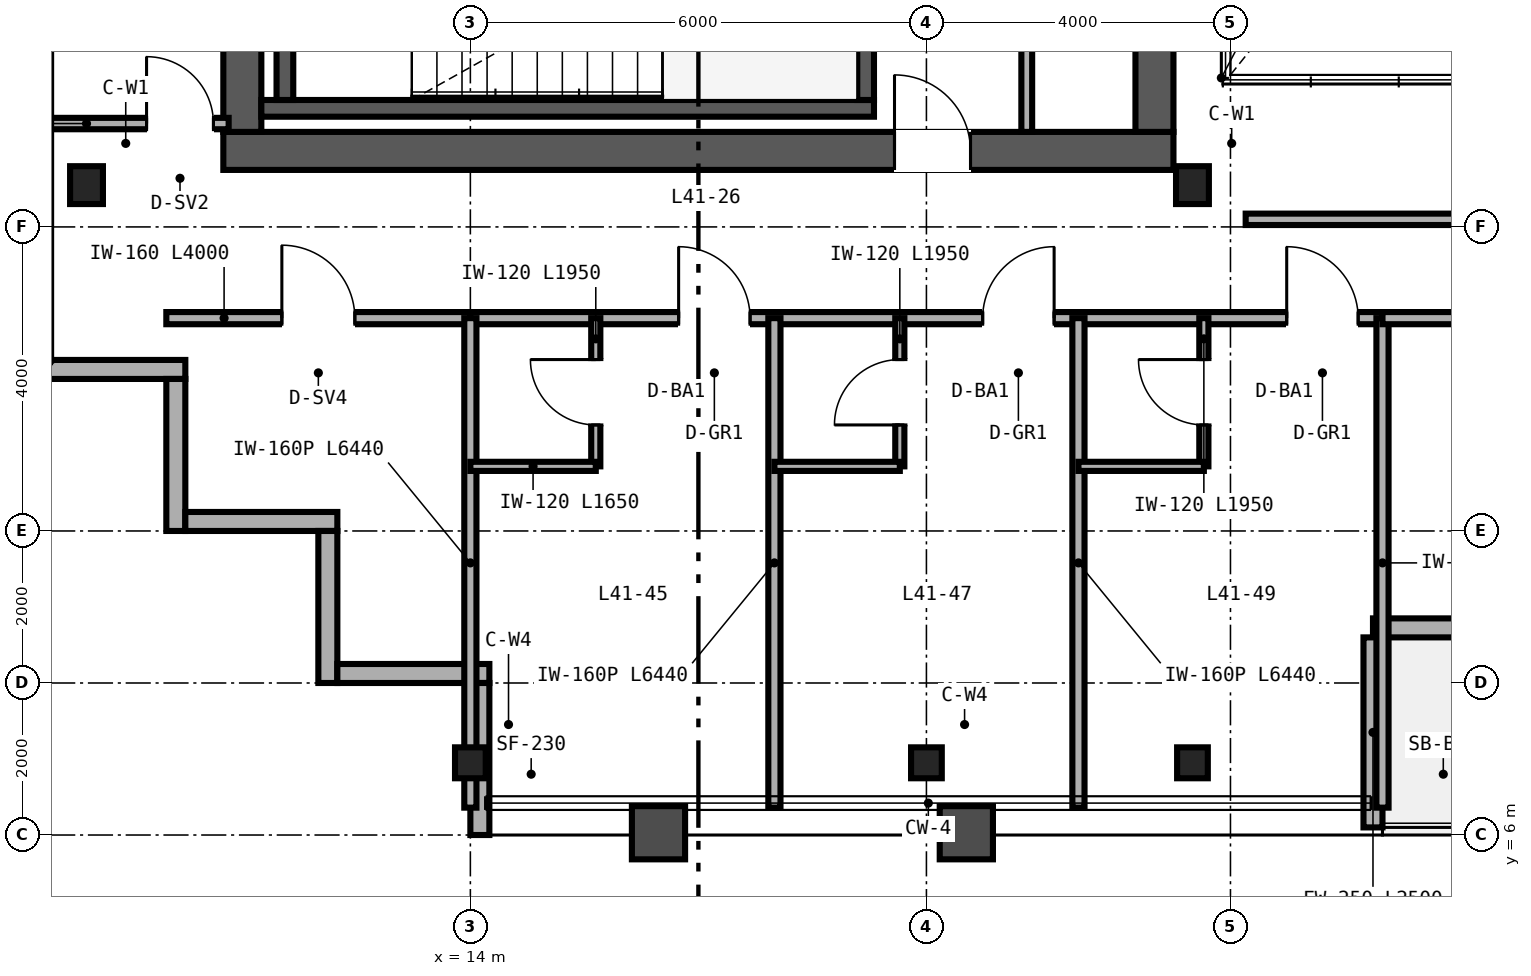
"""IFC4 building model, lengths in metres.
Left out: names, types, materials, properties, quantities, classifications, styles, units other than length and angle.
Written with IfcOpenShell. Run it as: python <this file> out.ifc"""

import sys

from ifc_helpers import new_model, si_unit, direction, frame, frame_2d, origin, origin_2d, place, context, subcontext, project, spatial, rectangle, i_section, extrude, source, transform, mapped, element, fill, save


model = new_model("IFC4")
c1 = context("Model", 3, precision=1e-05, world=origin(), true_north=direction((0.0, 1.0)))
c2 = subcontext(c1, "Body", "Model", "MODEL_VIEW")
j1 = project(units=[si_unit("LENGTHUNIT", "METRE"), si_unit("PLANEANGLEUNIT", "RADIAN")], contexts=[c1])
p1 = place(None, origin())
s1 = spatial("IfcSite", under=j1, at=p1, CompositionType="ELEMENT")
p2 = place(p1, origin())
s2 = spatial("IfcBuilding", under=s1, at=p2, CompositionType="ELEMENT")
p3 = place(p2, frame((0.0, 0.0, 166.8)))
s3 = spatial("IfcBuildingStorey", under=s2, at=p3, CompositionType="ELEMENT", Elevation=166.8)
p4 = place(p3, frame((10.75, 15.0, 0.0), z_axis=(0.0, 0.0, 1.0), x_axis=(1.0, 0.0, 0.0)))
e1 = element("IfcWall", 1, at=p4, inside=s3, PredefinedType="SHEAR", context=c2, shape_type="SweptSolid", body=[
    extrude(rectangle(XDim=12.5, YDim=0.5, at=frame_2d((6.25, 0.0))), origin(), (0.0, 0.0, 1.0), 3.37),
])
p5 = place(p4, frame((8.83, 0.0, 0.0)))
e2 = element("IfcOpeningElement", 2, at=p5, cuts=e1, PredefinedType="OPENING", context=c2, shape_type="SweptSolid", body=[
    extrude(rectangle(XDim=1.0, YDim=2.15, at=frame_2d((0.5, 1.075))), frame((0.0, 0.26, 0.0), z_axis=(0.0, -1.0, 0.0), x_axis=(1.0, 0.0, 0.0)), (0.0, 0.0, 1.0), 0.52),
])
for number, where, z_axis, x_axis in (
    (3, (11.0, 15.25, 0.0), (0.0, 0.0, 1.0), (0.0, 1.0, 0.0)),
    (4, (23.0, 15.25, 0.0), (0.0, 0.0, 1.0), (0.0, 1.0, 0.0)),
):
    element("IfcWall", number, at=place(p3, frame(where, z_axis=z_axis, x_axis=x_axis)), inside=s3, PredefinedType="SHEAR", context=c2, shape_type="SweptSolid", body=[
        extrude(rectangle(XDim=21.5, YDim=0.5, at=frame_2d((10.75, 0.0))), origin(), (0.0, 0.0, 1.0), 3.37),
    ])
p6 = place(p3, frame((11.25, 15.56, 0.0), z_axis=(0.0, 0.0, 1.0), x_axis=(1.0, 0.0, 0.0)))
e5 = element("IfcWall", 5, at=p6, inside=s3, PredefinedType="SHEAR", context=c2, shape_type="SweptSolid", body=[
    extrude(rectangle(XDim=8.06, YDim=0.22, at=frame_2d((4.03, 0.0))), origin(), (0.0, 0.0, 1.0), 3.4),
])
for number, where, z_axis, x_axis in (
    (6, (11.56, 15.67, 0.0), (0.0, 0.0, 1.0), (0.0, 1.0, 0.0)),
    (7, (19.2, 15.67, 0.0), (0.0, 0.0, 1.0), (0.0, 1.0, 0.0)),
):
    element("IfcWall", number, at=place(p3, frame(where, z_axis=z_axis, x_axis=x_axis)), inside=s3, PredefinedType="SHEAR", context=c2, shape_type="SweptSolid", body=[
        extrude(rectangle(XDim=3.28, YDim=0.22, at=frame_2d((1.64, 0.0))), origin(), (0.0, 0.0, 1.0), 3.4),
    ])
m1 = source(origin(), c2, "Body", "SweptSolid", [
    extrude(i_section(OverallWidth=0.432, OverallDepth=0.498, WebThickness=0.056, FlangeThickness=0.089, FilletRadius=0.025, at=origin_2d()), origin(), (0.0, 0.0, 1.0), 3.37),
])
for number, where, z_axis, x_axis in (
    (8, (8.95, 14.55, 0.0), (0.0, 0.0, 1.0), (1.0, 0.0, 0.0)),
    (9, (23.5, 14.55, 0.0), (0.0, 0.0, 1.0), (1.0, 0.0, 0.0)),
):
    element("IfcColumn", number, at=place(p3, frame(where, z_axis=z_axis, x_axis=x_axis)), inside=s3, PredefinedType="COLUMN", context=c2, shape_type="MappedRepresentation", body=[
        mapped(m1, transform((0.0, 0.0, 0.0), scale=1.0)),
    ])
m2 = source(origin(), c2, "Body", "SweptSolid", [
    extrude(i_section(OverallWidth=0.404, OverallDepth=0.407, WebThickness=0.027, FlangeThickness=0.044, FilletRadius=0.025, at=origin_2d()), origin(), (0.0, 0.0, 1.0), 3.37),
])
for number, where, z_axis, x_axis in (
    (10, (14.0, 6.95, 0.0), (0.0, 0.0, 1.0), (1.0, 0.0, 0.0)),
    (11, (20.0, 6.95, 0.0), (0.0, 0.0, 1.0), (1.0, 0.0, 0.0)),
    (12, (23.5, 6.95, 0.0), (0.0, 0.0, 1.0), (1.0, 0.0, 0.0)),
):
    element("IfcColumn", number, at=place(p3, frame(where, z_axis=z_axis, x_axis=x_axis)), inside=s3, PredefinedType="COLUMN", context=c2, shape_type="MappedRepresentation", body=[
        mapped(m2, transform((0.0, 0.0, 0.0), scale=1.0)),
    ])
p7 = place(p3, frame((8.0, 12.125, 0.0), z_axis=(0.0, 0.0, 1.0), x_axis=(1.0, 0.0, 0.0)))
e13 = element("IfcWall", 13, at=p7, inside=s3, PredefinedType="SOLIDWALL", context=c2, shape_type="SweptSolid", body=[
    extrude(rectangle(XDim=2.25, YDim=0.25, at=frame_2d((1.125, 0.0))), origin(), (0.0, 0.0, 1.0), 3.37),
])
for number, where, z_axis, x_axis in (
    (14, (10.125, 12.0, 0.0), (0.0, 0.0, 1.0), (0.0, -1.0, 0.0)),
    (15, (10.25, 10.125, 0.0), (0.0, 0.0, 1.0), (1.0, 0.0, 0.0)),
    (16, (12.125, 10.0, 0.0), (0.0, 0.0, 1.0), (0.0, -1.0, 0.0)),
    (17, (12.25, 8.125, 0.0), (0.0, 0.0, 1.0), (1.0, 0.0, 0.0)),
):
    element("IfcWall", number, at=place(p3, frame(where, z_axis=z_axis, x_axis=x_axis)), inside=s3, PredefinedType="SOLIDWALL", context=c2, shape_type="SweptSolid", body=[
        extrude(rectangle(XDim=2.0, YDim=0.25, at=frame_2d((1.0, 0.0))), origin(), (0.0, 0.0, 1.0), 3.37),
    ])
p8 = place(p3, frame((14.125, 8.0, 0.0), z_axis=(0.0, 0.0, 1.0), x_axis=(0.0, -1.0, 0.0)))
e18 = element("IfcWall", 18, at=p8, inside=s3, PredefinedType="SOLIDWALL", context=c2, shape_type="SweptSolid", body=[
    extrude(rectangle(XDim=2.0, YDim=0.25, at=frame_2d((1.0, 0.0))), origin(), (0.0, 0.0, 1.0), 2.677),
])
p9 = place(p3, frame((25.875, 8.725, 0.0), z_axis=(0.0, 0.0, 1.0), x_axis=(1.0, 0.0, 0.0)))
e19 = element("IfcWall", 19, at=p9, inside=s3, PredefinedType="SOLIDWALL", context=c2, shape_type="SweptSolid", body=[
    extrude(rectangle(XDim=12.25, YDim=0.25, at=frame_2d((6.125, 0.0))), origin(), (0.0, 0.0, 1.0), 3.37),
])
p10 = place(p9, frame((5.6, 0.0, 0.0)))
e20 = element("IfcOpeningElement", 20, at=p10, cuts=e19, PredefinedType="OPENING", context=c2, shape_type="SweptSolid", body=[
    extrude(rectangle(XDim=1.05, YDim=2.15, at=frame_2d((0.525, 1.075))), frame((0.0, 0.135, 0.0), z_axis=(0.0, -1.0, 0.0), x_axis=(1.0, 0.0, 0.0)), (0.0, 0.0, 1.0), 0.27),
])
p11 = place(p3, frame((25.875, 6.1, 0.0), z_axis=(0.0, 0.0, 1.0), x_axis=(0.0, 1.0, 0.0)))
e21 = element("IfcWall", 21, at=p11, inside=s3, PredefinedType="SOLIDWALL", context=c2, shape_type="SweptSolid", body=[
    extrude(rectangle(XDim=2.5, YDim=0.25, at=frame_2d((1.25, 0.0))), origin(), (0.0, 0.0, 1.0), 2.443),
])
p12 = place(p3, frame((21.32, 15.25, 0.0), z_axis=(0.0, 0.0, 1.0), x_axis=(0.0, 1.0, 0.0)))
e22 = element("IfcWall", 22, at=p12, inside=s3, PredefinedType="PARTITIONING", context=c2, shape_type="SweptSolid", body=[
    extrude(rectangle(XDim=3.59, YDim=0.142, at=frame_2d((1.795, 0.0))), origin(), (0.0, 0.0, 1.0), 3.37),
])
p13 = place(p12, frame((1.25, 0.0, 0.0)))
e23 = element("IfcOpeningElement", 23, at=p13, cuts=e22, PredefinedType="OPENING", context=c2, shape_type="SweptSolid", body=[
    extrude(rectangle(XDim=0.84, YDim=2.1, at=frame_2d((0.42, 1.05))), frame((0.0, 0.081, 0.0), z_axis=(0.0, -1.0, 0.0), x_axis=(1.0, 0.0, 0.0)), (0.0, 0.0, 1.0), 0.162),
])
p14 = place(p3, frame((24.2, 14.1, 0.0), z_axis=(0.0, 0.0, 1.0), x_axis=(1.0, 0.0, 0.0)))
e24 = element("IfcWall", 24, at=p14, inside=s3, PredefinedType="PARTITIONING", context=c2, shape_type="SweptSolid", body=[
    extrude(rectangle(XDim=15.6, YDim=0.15, at=frame_2d((7.8, 0.0))), origin(), (0.0, 0.0, 1.0), 3.37),
])
p15 = place(p14, frame((7.0, 0.0, 0.0)))
e25 = element("IfcOpeningElement", 25, at=p15, cuts=e24, PredefinedType="OPENING", context=c2, shape_type="SweptSolid", body=[
    extrude(rectangle(XDim=0.96, YDim=2.15, at=frame_2d((0.48, 1.075))), frame((0.0, 0.085, 0.0), z_axis=(0.0, -1.0, 0.0), x_axis=(1.0, 0.0, 0.0)), (0.0, 0.0, 1.0), 0.17),
])
p16 = place(p3, frame((8.16, 15.36, 0.0), z_axis=(0.0, 0.0, 1.0), x_axis=(1.0, 0.0, 0.0)))
e26 = element("IfcWall", 26, at=p16, inside=s3, PredefinedType="PARTITIONING", context=c2, shape_type="SweptSolid", body=[
    extrude(rectangle(XDim=2.66, YDim=0.15, at=frame_2d((1.33, 0.0))), origin(), (0.0, 0.0, 1.0), 2.591),
])
p17 = place(p16, frame((1.58, 0.0, 0.0)))
e27 = element("IfcOpeningElement", 27, at=p17, cuts=e26, PredefinedType="OPENING", context=c2, shape_type="SweptSolid", body=[
    extrude(rectangle(XDim=0.88, YDim=2.15, at=frame_2d((0.44, 1.075))), frame((0.0, 0.085, 0.0), z_axis=(0.0, -1.0, 0.0), x_axis=(1.0, 0.0, 0.0)), (0.0, 0.0, 1.0), 0.17),
])
p18 = place(p3, frame((10.0, 12.8, 0.0), z_axis=(0.0, 0.0, 1.0), x_axis=(1.0, 0.0, 0.0)))
e28 = element("IfcWall", 28, at=p18, inside=s3, PredefinedType="PARTITIONING", context=c2, shape_type="SweptSolid", body=[
    extrude(rectangle(XDim=4.0, YDim=0.16, at=frame_2d((2.0, 0.0))), origin(), (0.0, 0.0, 1.0), 3.37),
])
p19 = place(p18, frame((1.52, 0.0, 0.0)))
e29 = element("IfcOpeningElement", 29, at=p19, cuts=e28, PredefinedType="OPENING", context=c2, shape_type="SweptSolid", body=[
    extrude(rectangle(XDim=0.96, YDim=2.15, at=frame_2d((0.48, 1.075))), frame((0.0, 0.09, 0.0), z_axis=(0.0, -1.0, 0.0), x_axis=(1.0, 0.0, 0.0)), (0.0, 0.0, 1.0), 0.18),
])
p20 = place(p3, frame((14.0, 12.8, 0.0), z_axis=(0.0, 0.0, 1.0), x_axis=(1.0, 0.0, 0.0)))
e30 = element("IfcWall", 30, at=p20, inside=s3, PredefinedType="PARTITIONING", context=c2, shape_type="SweptSolid", body=[
    extrude(rectangle(XDim=12.0, YDim=0.16, at=frame_2d((6.0, 0.0))), origin(), (0.0, 0.0, 1.0), 2.913),
])
p21 = place(p20, frame((2.74, 0.0, 0.0)))
e31 = element("IfcOpeningElement", 31, at=p21, cuts=e30, PredefinedType="OPENING", context=c2, shape_type="SweptSolid", body=[
    extrude(rectangle(XDim=0.94, YDim=2.15, at=frame_2d((0.47, 1.075))), frame((0.0, 0.09, 0.0), z_axis=(0.0, -1.0, 0.0), x_axis=(1.0, 0.0, 0.0)), (0.0, 0.0, 1.0), 0.18),
])
p22 = place(p20, frame((6.74, 0.0, 0.0)))
e32 = element("IfcOpeningElement", 32, at=p22, cuts=e30, PredefinedType="OPENING", context=c2, shape_type="SweptSolid", body=[
    extrude(rectangle(XDim=0.94, YDim=2.15, at=frame_2d((0.47, 1.075))), frame((0.0, 0.09, 0.0), z_axis=(0.0, -1.0, 0.0), x_axis=(1.0, 0.0, 0.0)), (0.0, 0.0, 1.0), 0.18),
])
p23 = place(p20, frame((10.74, 0.0, 0.0)))
e33 = element("IfcOpeningElement", 33, at=p23, cuts=e30, PredefinedType="OPENING", context=c2, shape_type="SweptSolid", body=[
    extrude(rectangle(XDim=0.94, YDim=2.15, at=frame_2d((0.47, 1.075))), frame((0.0, 0.09, 0.0), z_axis=(0.0, -1.0, 0.0), x_axis=(1.0, 0.0, 0.0)), (0.0, 0.0, 1.0), 0.18),
])
p24 = place(p3, frame((14.0, 6.36, 0.0), z_axis=(0.0, 0.0, 1.0), x_axis=(0.0, 1.0, 0.0)))
e34 = element("IfcWall", 34, at=p24, inside=s3, PredefinedType="PARTITIONING", context=c2, shape_type="SweptSolid", body=[
    extrude(rectangle(XDim=6.44, YDim=0.16, at=frame_2d((3.22, 0.0))), origin(), (0.0, 0.0, 1.0), 2.677),
])
p25 = place(p3, frame((26.0, 6.36, 0.0), z_axis=(0.0, 0.0, 1.0), x_axis=(0.0, 1.0, 0.0)))
e35 = element("IfcWall", 35, at=p25, inside=s3, PredefinedType="PARTITIONING", context=c2, shape_type="SweptSolid", body=[
    extrude(rectangle(XDim=6.44, YDim=0.16, at=frame_2d((3.22, 0.0))), origin(), (0.0, 0.0, 1.0), 2.443),
])
p26 = place(p3, frame((18.0, 6.36, 0.0), z_axis=(0.0, 0.0, 1.0), x_axis=(0.0, 1.0, 0.0)))
e36 = element("IfcWall", 36, at=p26, inside=s3, PredefinedType="PARTITIONING", context=c2, shape_type="SweptSolid", body=[
    extrude(rectangle(XDim=6.44, YDim=0.16, at=frame_2d((3.22, 0.0))), origin(), (0.0, 0.0, 1.0), 2.677),
])
p27 = place(p3, frame((15.65, 10.85, 0.0), z_axis=(0.0, 0.0, 1.0), x_axis=(0.0, 1.0, 0.0)))
e37 = element("IfcWall", 37, at=p27, inside=s3, PredefinedType="PARTITIONING", context=c2, shape_type="SweptSolid", body=[
    extrude(rectangle(XDim=1.95, YDim=0.12, at=frame_2d((0.975, 0.0))), origin(), (0.0, 0.0, 1.0), 3.37),
])
p28 = place(p27, frame((0.545, 0.0, 0.0)))
e38 = element("IfcOpeningElement", 38, at=p28, cuts=e37, PredefinedType="OPENING", context=c2, shape_type="SweptSolid", body=[
    extrude(rectangle(XDim=0.86, YDim=2.1, at=frame_2d((0.43, 1.05))), frame((0.0, 0.07, 0.0), z_axis=(0.0, -1.0, 0.0), x_axis=(1.0, 0.0, 0.0)), (0.0, 0.0, 1.0), 0.14),
])
p29 = place(p3, frame((14.0, 10.85, 0.0), z_axis=(0.0, 0.0, 1.0), x_axis=(1.0, 0.0, 0.0)))
e39 = element("IfcWall", 39, at=p29, inside=s3, PredefinedType="PARTITIONING", context=c2, shape_type="SweptSolid", body=[
    extrude(rectangle(XDim=1.65, YDim=0.12, at=frame_2d((0.825, 0.0))), origin(), (0.0, 0.0, 1.0), 3.37),
])
p30 = place(p3, frame((22.0, 6.36, 0.0), z_axis=(0.0, 0.0, 1.0), x_axis=(0.0, 1.0, 0.0)))
e40 = element("IfcWall", 40, at=p30, inside=s3, PredefinedType="PARTITIONING", context=c2, shape_type="SweptSolid", body=[
    extrude(rectangle(XDim=6.44, YDim=0.16, at=frame_2d((3.22, 0.0))), origin(), (0.0, 0.0, 1.0), 2.833),
])
p31 = place(p3, frame((19.65, 10.85, 0.0), z_axis=(0.0, 0.0, 1.0), x_axis=(0.0, 1.0, 0.0)))
e41 = element("IfcWall", 41, at=p31, inside=s3, PredefinedType="PARTITIONING", context=c2, shape_type="SweptSolid", body=[
    extrude(rectangle(XDim=1.95, YDim=0.12, at=frame_2d((0.975, 0.0))), origin(), (0.0, 0.0, 1.0), 3.37),
])
p32 = place(p31, frame((0.545, 0.0, 0.0)))
e42 = element("IfcOpeningElement", 42, at=p32, cuts=e41, PredefinedType="OPENING", context=c2, shape_type="SweptSolid", body=[
    extrude(rectangle(XDim=0.86, YDim=2.1, at=frame_2d((0.43, 1.05))), frame((0.0, 0.07, 0.0), z_axis=(0.0, -1.0, 0.0), x_axis=(1.0, 0.0, 0.0)), (0.0, 0.0, 1.0), 0.14),
])
p33 = place(p3, frame((18.0, 10.85, 0.0), z_axis=(0.0, 0.0, 1.0), x_axis=(1.0, 0.0, 0.0)))
e43 = element("IfcWall", 43, at=p33, inside=s3, PredefinedType="PARTITIONING", context=c2, shape_type="SweptSolid", body=[
    extrude(rectangle(XDim=1.65, YDim=0.12, at=frame_2d((0.825, 0.0))), origin(), (0.0, 0.0, 1.0), 3.37),
])
p34 = place(p3, frame((23.65, 10.85, 0.0), z_axis=(0.0, 0.0, 1.0), x_axis=(0.0, 1.0, 0.0)))
e44 = element("IfcWall", 44, at=p34, inside=s3, PredefinedType="PARTITIONING", context=c2, shape_type="SweptSolid", body=[
    extrude(rectangle(XDim=1.95, YDim=0.12, at=frame_2d((0.975, 0.0))), origin(), (0.0, 0.0, 1.0), 2.913),
])
p35 = place(p34, frame((0.545, 0.0, 0.0)))
e45 = element("IfcOpeningElement", 45, at=p35, cuts=e44, PredefinedType="OPENING", context=c2, shape_type="SweptSolid", body=[
    extrude(rectangle(XDim=0.86, YDim=2.1, at=frame_2d((0.43, 1.05))), frame((0.0, 0.07, 0.0), z_axis=(0.0, -1.0, 0.0), x_axis=(1.0, 0.0, 0.0)), (0.0, 0.0, 1.0), 0.14),
])
p36 = place(p3, frame((22.0, 10.85, 0.0), z_axis=(0.0, 0.0, 1.0), x_axis=(1.0, 0.0, 0.0)))
e46 = element("IfcWall", 46, at=p36, inside=s3, PredefinedType="PARTITIONING", context=c2, shape_type="SweptSolid", body=[
    extrude(rectangle(XDim=1.65, YDim=0.12, at=frame_2d((0.825, 0.0))), origin(), (0.0, 0.0, 1.0), 2.913),
])
p37 = place(p3, frame((26.0, 12.8, 0.0), z_axis=(0.0, 0.0, 1.0), x_axis=(1.0, 0.0, 0.0)))
e47 = element("IfcWall", 47, at=p37, inside=s3, PredefinedType="PARTITIONING", context=c2, shape_type="SweptSolid", body=[
    extrude(rectangle(XDim=12.0, YDim=0.16, at=frame_2d((6.0, 0.0))), origin(), (0.0, 0.0, 1.0), 3.37),
])
p38 = place(p37, frame((5.2, 0.0, 0.0)))
e48 = element("IfcOpeningElement", 48, at=p38, cuts=e47, PredefinedType="OPENING", context=c2, shape_type="SweptSolid", body=[
    extrude(rectangle(XDim=0.96, YDim=2.15, at=frame_2d((0.48, 1.075))), frame((0.0, 0.09, 0.0), z_axis=(0.0, -1.0, 0.0), x_axis=(1.0, 0.0, 0.0)), (0.0, 0.0, 1.0), 0.18),
])
m3 = source(origin(), c2, "Body", "SweptSolid", [
    extrude(rectangle(XDim=1.0, YDim=2.15, at=frame_2d((0.5, 1.075))), frame((0.0, 0.025, 0.0), z_axis=(0.0, -1.0, 0.0), x_axis=(1.0, 0.0, 0.0)), (0.0, 0.0, 1.0), 0.05),
])
p39 = place(p5, origin())
e49 = element("IfcDoor", 49, at=p39, inside=s3, OperationType="SINGLE_SWING_LEFT", PredefinedType="DOOR", context=c2, shape_type="MappedRepresentation", body=[
    mapped(m3, transform((0.0, 0.0, 0.0), scale=1.0)),
])
fill(e2, e49)
m4 = source(origin(), c2, "Body", "SweptSolid", [
    extrude(rectangle(XDim=0.88, YDim=2.15, at=frame_2d((0.44, 1.075))), frame((0.0, 0.025, 0.0), z_axis=(0.0, -1.0, 0.0), x_axis=(1.0, 0.0, 0.0)), (0.0, 0.0, 1.0), 0.05),
])
p40 = place(p17, origin())
e50 = element("IfcDoor", 50, at=p40, inside=s3, OperationType="SINGLE_SWING_LEFT", PredefinedType="DOOR", context=c2, shape_type="MappedRepresentation", body=[
    mapped(m4, transform((0.0, 0.0, 0.0), scale=1.0)),
])
fill(e27, e50)
m5 = source(origin(), c2, "Body", "SweptSolid", [
    extrude(rectangle(XDim=0.96, YDim=2.15, at=frame_2d((0.48, 1.075))), frame((0.0, 0.025, 0.0), z_axis=(0.0, -1.0, 0.0), x_axis=(1.0, 0.0, 0.0)), (0.0, 0.0, 1.0), 0.05),
])
p41 = place(p19, origin())
e51 = element("IfcDoor", 51, at=p41, inside=s3, OperationType="SINGLE_SWING_LEFT", PredefinedType="DOOR", context=c2, shape_type="MappedRepresentation", body=[
    mapped(m5, transform((0.0, 0.0, 0.0), scale=1.0)),
])
fill(e29, e51)
m6 = source(origin(), c2, "Body", "SweptSolid", [
    extrude(rectangle(XDim=0.86, YDim=2.1, at=frame_2d((0.43, 1.05))), frame((0.0, 0.025, 0.0), z_axis=(0.0, -1.0, 0.0), x_axis=(1.0, 0.0, 0.0)), (0.0, 0.0, 1.0), 0.05),
])
p42 = place(p28, origin())
e52 = element("IfcDoor", 52, at=p42, inside=s3, OperationType="SINGLE_SWING_RIGHT", PredefinedType="DOOR", context=c2, shape_type="MappedRepresentation", body=[
    mapped(m6, transform((0.0, 0.0, 0.0), scale=1.0)),
])
fill(e38, e52)
p43 = place(p32, origin())
e53 = element("IfcDoor", 53, at=p43, inside=s3, OperationType="SINGLE_SWING_LEFT", PredefinedType="DOOR", context=c2, shape_type="MappedRepresentation", body=[
    mapped(m6, transform((0.0, 0.0, 0.0), scale=1.0)),
])
fill(e42, e53)
p44 = place(p35, origin())
e54 = element("IfcDoor", 54, at=p44, inside=s3, OperationType="SINGLE_SWING_RIGHT", PredefinedType="DOOR", context=c2, shape_type="MappedRepresentation", body=[
    mapped(m6, transform((0.0, 0.0, 0.0), scale=1.0)),
])
fill(e45, e54)
m7 = source(origin(), c2, "Body", "SweptSolid", [
    extrude(rectangle(XDim=0.94, YDim=2.15, at=frame_2d((0.47, 1.075))), frame((0.0, 0.025, 0.0), z_axis=(0.0, -1.0, 0.0), x_axis=(1.0, 0.0, 0.0)), (0.0, 0.0, 1.0), 0.05),
])
p45 = place(p21, origin())
e55 = element("IfcDoor", 55, at=p45, inside=s3, OperationType="SINGLE_SWING_LEFT", PredefinedType="DOOR", context=c2, shape_type="MappedRepresentation", body=[
    mapped(m7, transform((0.0, 0.0, 0.0), scale=1.0)),
])
fill(e31, e55)
p46 = place(p22, origin())
e56 = element("IfcDoor", 56, at=p46, inside=s3, OperationType="SINGLE_SWING_RIGHT", PredefinedType="DOOR", context=c2, shape_type="MappedRepresentation", body=[
    mapped(m7, transform((0.0, 0.0, 0.0), scale=1.0)),
])
fill(e32, e56)
p47 = place(p23, origin())
e57 = element("IfcDoor", 57, at=p47, inside=s3, OperationType="SINGLE_SWING_LEFT", PredefinedType="DOOR", context=c2, shape_type="MappedRepresentation", body=[
    mapped(m7, transform((0.0, 0.0, 0.0), scale=1.0)),
])
fill(e33, e57)
save(model, sys.argv[1])
